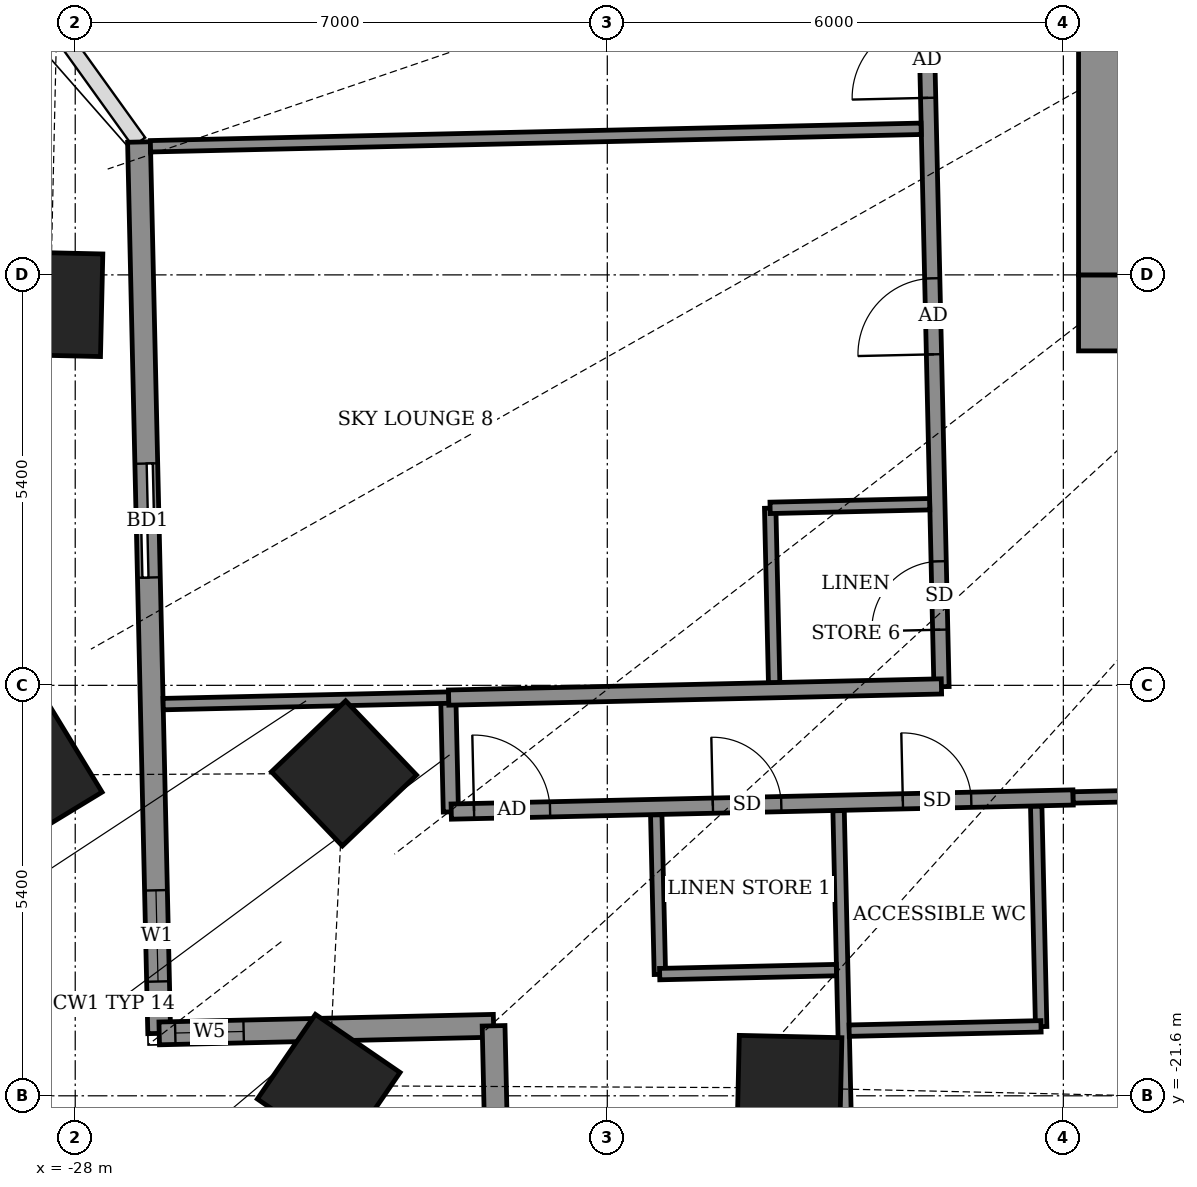
"""IFC4 building model, lengths in metres.
Left out: names, types, materials, properties, quantities, classifications, styles, units other than length and angle.
Written with IfcOpenShell. Run it as: python <this file> out.ifc"""

import sys

from ifc_helpers import new_model, si_unit, direction, frame, frame_2d, origin, origin_2d, place, context, subcontext, project, spatial, rectangle, extrude, element, fill, save


model = new_model("IFC4")
c1 = context("Model", 3, precision=1e-05, world=origin(), true_north=direction((0.0, 1.0)))
c2 = subcontext(c1, "Body", "Model", "MODEL_VIEW")
j1 = project(units=[si_unit("LENGTHUNIT", "METRE"), si_unit("PLANEANGLEUNIT", "RADIAN")], contexts=[c1])
p1 = place(None, origin())
s1 = spatial("IfcSite", under=j1, at=p1, CompositionType="ELEMENT")
p2 = place(p1, origin())
s2 = spatial("IfcBuilding", under=s1, at=p2, CompositionType="ELEMENT")
p3 = place(p2, frame((0.0, 0.0, 125.5)))
s3 = spatial("IfcBuildingStorey", under=s2, at=p3, CompositionType="ELEMENT", Elevation=125.5)
for number, where, z_axis, x_axis in (
    (1, (-28.327, -11.184, -0.55), (0.0, 0.0, 1.0), (-0.023, -1.0, 0.0)),
    (2, (-28.574, -17.379, -0.55), (0.0, 0.0, 1.0), (0.52, -0.854, 0.0)),
    (3, (-24.464, -17.359, -0.55), (0.0, 0.0, 1.0), (0.691, -0.723, 0.0)),
    (4, (-24.665, -21.467, -0.55), (0.0, 0.0, 1.0), (0.825, -0.566, 0.0)),
    (5, (-18.604, -21.495, -0.55), (0.0, 0.0, 1.0), (1.0, -0.023, 0.0)),
):
    element("IfcColumn", number, at=place(p3, frame(where, z_axis=z_axis, x_axis=x_axis)), inside=s3, PredefinedType="COLUMN", context=c2, shape_type="SweptSolid", body=[
        extrude(rectangle(XDim=1.35, YDim=1.35, at=origin_2d()), origin(), (0.0, 0.0, 1.0), 4.6),
    ])
p4 = place(p3, frame((-27.161, -9.052, 0.0), z_axis=(0.0, 0.0, 1.0), x_axis=(0.022665616813, -0.999743101909, 0.0)))
e6 = element("IfcWall", 6, at=p4, inside=s3, PredefinedType="SOLIDWALL", context=c2, shape_type="SweptSolid", body=[
    extrude(rectangle(XDim=11.73, YDim=0.3, at=frame_2d((5.865, 0.0))), origin(), (0.0, 0.0, 1.0), 2.55),
])
p5 = place(p4, frame((4.231, 0.0, 0.0)))
e7 = element("IfcOpeningElement", 7, at=p5, cuts=e6, PredefinedType="OPENING", context=c2, shape_type="SweptSolid", body=[
    extrude(rectangle(XDim=1.5, YDim=2.4, at=frame_2d((0.75, 1.2))), frame((0.0, 0.16, 0.0), z_axis=(0.0, -1.0, 0.0), x_axis=(1.0, 0.0, 0.0)), (0.0, 0.0, 1.0), 0.32),
])
p6 = place(p4, frame((9.847, 0.0, 0.9)))
e8 = element("IfcOpeningElement", 8, at=p6, cuts=e6, PredefinedType="OPENING", context=c2, shape_type="SweptSolid", body=[
    extrude(rectangle(XDim=1.2, YDim=1.5, at=frame_2d((0.6, 0.75))), frame((0.0, 0.16, 0.0), z_axis=(0.0, -1.0, 0.0), x_axis=(1.0, 0.0, 0.0)), (0.0, 0.0, 1.0), 0.32),
])
p7 = place(p3, frame((-26.895, -20.779, 0.0), z_axis=(0.0, 0.0, 1.0), x_axis=(0.999741204967, 0.022749133868, 0.0)))
e9 = element("IfcWall", 9, at=p7, inside=s3, PredefinedType="SOLIDWALL", context=c2, shape_type="SweptSolid", body=[
    extrude(rectangle(XDim=4.4, YDim=0.3, at=frame_2d((2.2, 0.0))), origin(), (0.0, 0.0, 1.0), 2.65),
])
p8 = place(p7, frame((0.211, 0.0, 0.9)))
e10 = element("IfcOpeningElement", 10, at=p8, cuts=e9, PredefinedType="OPENING", context=c2, shape_type="SweptSolid", body=[
    extrude(rectangle(XDim=0.9, YDim=1.5, at=frame_2d((0.45, 0.75))), frame((0.0, 0.16, 0.0), z_axis=(0.0, -1.0, 0.0), x_axis=(1.0, 0.0, 0.0)), (0.0, 0.0, 1.0), 0.32),
])
p9 = place(p3, frame((-22.496, -20.679, 0.0), z_axis=(0.0, 0.0, 1.0), x_axis=(0.022749133868, -0.999741204967, 0.0)))
e11 = element("IfcWall", 11, at=p9, inside=s3, PredefinedType="SOLIDWALL", context=c2, shape_type="SweptSolid", body=[
    extrude(rectangle(XDim=4.4, YDim=0.3, at=frame_2d((2.2, 0.0))), origin(), (0.0, 0.0, 1.0), 2.65),
])
p10 = place(p9, frame((1.15, 0.0, 0.9)))
e12 = element("IfcOpeningElement", 12, at=p10, cuts=e11, PredefinedType="OPENING", context=c2, shape_type="SweptSolid", body=[
    extrude(rectangle(XDim=2.4, YDim=1.5, at=frame_2d((1.2, 0.75))), frame((0.0, 0.16, 0.0), z_axis=(0.0, -1.0, 0.0), x_axis=(1.0, 0.0, 0.0)), (0.0, 0.0, 1.0), 0.32),
])
p11 = place(p3, frame((-17.798, -24.824, 0.0), z_axis=(0.0, 0.0, 1.0), x_axis=(-0.022781023197, 0.999740478815, 0.0)))
e13 = element("IfcWall", 13, at=p11, inside=s3, PredefinedType="PARTITIONING", context=c2, shape_type="SweptSolid", body=[
    extrude(rectangle(XDim=6.977, YDim=0.15, at=frame_2d((3.488, 0.0))), origin(), (0.0, 0.0, 1.0), 2.65),
])
p12 = place(p3, frame((-15.292, -20.69, 0.0), z_axis=(0.0, 0.0, 1.0), x_axis=(-0.022388729138, 0.999749340989, 0.0)))
e14 = element("IfcWall", 14, at=p12, inside=s3, PredefinedType="PARTITIONING", context=c2, shape_type="SweptSolid", body=[
    extrude(rectangle(XDim=2.901, YDim=0.15, at=frame_2d((1.45, 0.0))), origin(), (0.0, 0.0, 1.0), 2.75),
])
p13 = place(p3, frame((-17.818, -20.743, 0.0), z_axis=(0.0, 0.0, 1.0), x_axis=(0.999746160391, 0.022530308093, 0.0)))
e15 = element("IfcWall", 15, at=p13, inside=s3, PredefinedType="PARTITIONING", context=c2, shape_type="SweptSolid", body=[
    extrude(rectangle(XDim=2.525, YDim=0.15, at=frame_2d((1.262, 0.0))), origin(), (0.0, 0.0, 1.0), 2.75),
])
p14 = place(p3, frame((-20.308, -20.003, 0.0), z_axis=(0.0, 0.0, 1.0), x_axis=(-0.022792727877, 0.999740212033, 0.0)))
e16 = element("IfcWall", 16, at=p14, inside=s3, PredefinedType="PARTITIONING", context=c2, shape_type="SweptSolid", body=[
    extrude(rectangle(XDim=2.099, YDim=0.15, at=frame_2d((1.05, 0.0))), origin(), (0.0, 0.0, 1.0), 2.65),
])
p15 = place(p3, frame((-20.311, -19.999, 0.0), z_axis=(0.0, 0.0, 1.0), x_axis=(0.999740478815, 0.022781023197, 0.0)))
e17 = element("IfcWall", 17, at=p15, inside=s3, PredefinedType="PARTITIONING", context=c2, shape_type="SweptSolid", body=[
    extrude(rectangle(XDim=2.325, YDim=0.15, at=frame_2d((1.163, 0.0))), origin(), (0.0, 0.0, 1.0), 2.75),
])
p16 = place(p3, frame((-23.058, -17.865, 0.0), z_axis=(0.0, 0.0, 1.0), x_axis=(-0.022617910375, 0.999744182344, 0.0)))
e18 = element("IfcWall", 18, at=p16, inside=s3, PredefinedType="PARTITIONING", context=c2, shape_type="SweptSolid", body=[
    extrude(rectangle(XDim=1.5, YDim=0.2, at=frame_2d((0.75, 0.0))), origin(), (0.0, 0.0, 1.0), 2.85),
])
p17 = place(p3, frame((-23.053, -17.861, 0.0), z_axis=(0.0, 0.0, 1.0), x_axis=(0.999741542811, 0.022734282003, 0.0)))
e19 = element("IfcWall", 19, at=p17, inside=s3, PredefinedType="PARTITIONING", context=c2, shape_type="SweptSolid", body=[
    extrude(rectangle(XDim=8.183, YDim=0.2, at=frame_2d((4.092, 0.0))), origin(), (0.0, 0.0, 1.0), 2.65),
])
p18 = place(p17, frame((0.3, 0.0, 0.0)))
e20 = element("IfcOpeningElement", 20, at=p18, cuts=e19, PredefinedType="OPENING", context=c2, shape_type="SweptSolid", body=[
    extrude(rectangle(XDim=1.0, YDim=2.1, at=frame_2d((0.5, 1.05))), frame((0.0, 0.11, 0.0), z_axis=(0.0, -1.0, 0.0), x_axis=(1.0, 0.0, 0.0)), (0.0, 0.0, 1.0), 0.22),
])
p19 = place(p17, frame((3.443, 0.0, 0.0)))
e21 = element("IfcOpeningElement", 21, at=p19, cuts=e19, PredefinedType="OPENING", context=c2, shape_type="SweptSolid", body=[
    extrude(rectangle(XDim=0.9, YDim=2.1, at=frame_2d((0.45, 1.05))), frame((0.0, 0.11, 0.0), z_axis=(0.0, -1.0, 0.0), x_axis=(1.0, 0.0, 0.0)), (0.0, 0.0, 1.0), 0.22),
])
p20 = place(p17, frame((5.943, 0.0, 0.0)))
e22 = element("IfcOpeningElement", 22, at=p20, cuts=e19, PredefinedType="OPENING", context=c2, shape_type="SweptSolid", body=[
    extrude(rectangle(XDim=0.9, YDim=2.1, at=frame_2d((0.45, 1.05))), frame((0.0, 0.11, 0.0), z_axis=(0.0, -1.0, 0.0), x_axis=(1.0, 0.0, 0.0)), (0.0, 0.0, 1.0), 0.22),
])
p21 = place(p3, frame((-14.871, -17.675, 0.0), z_axis=(0.0, 0.0, 1.0), x_axis=(0.999742359486, 0.02269834024, 0.0)))
e23 = element("IfcWall", 23, at=p21, inside=s3, PredefinedType="PARTITIONING", context=c2, shape_type="SweptSolid", body=[
    extrude(rectangle(XDim=30.536, YDim=0.15, at=frame_2d((15.268, 0.0))), origin(), (0.0, 0.0, 1.0), 2.75),
])
p22 = place(p21, frame((0.784, 0.0, 0.0)))
e24 = element("IfcOpeningElement", 24, at=p22, cuts=e23, PredefinedType="OPENING", context=c2, shape_type="SweptSolid", body=[
    extrude(rectangle(XDim=1.0, YDim=2.1, at=frame_2d((0.5, 1.05))), frame((0.0, 0.085, 0.0), z_axis=(0.0, -1.0, 0.0), x_axis=(1.0, 0.0, 0.0)), (0.0, 0.0, 1.0), 0.17),
])
p23 = place(p21, frame((3.934, 0.0, 0.0)))
e25 = element("IfcOpeningElement", 25, at=p23, cuts=e23, PredefinedType="OPENING", context=c2, shape_type="SweptSolid", body=[
    extrude(rectangle(XDim=0.9, YDim=2.1, at=frame_2d((0.45, 1.05))), frame((0.0, 0.085, 0.0), z_axis=(0.0, -1.0, 0.0), x_axis=(1.0, 0.0, 0.0)), (0.0, 0.0, 1.0), 0.17),
])
p24 = place(p21, frame((11.384, 0.0, 0.0)))
e26 = element("IfcOpeningElement", 26, at=p24, cuts=e23, PredefinedType="OPENING", context=c2, shape_type="SweptSolid", body=[
    extrude(rectangle(XDim=0.9, YDim=2.1, at=frame_2d((0.45, 1.05))), frame((0.0, 0.085, 0.0), z_axis=(0.0, -1.0, 0.0), x_axis=(1.0, 0.0, 0.0)), (0.0, 0.0, 1.0), 0.17),
])
p25 = place(p21, frame((15.334, 0.0, 0.0)))
e27 = element("IfcOpeningElement", 27, at=p25, cuts=e23, PredefinedType="OPENING", context=c2, shape_type="SweptSolid", body=[
    extrude(rectangle(XDim=1.0, YDim=2.1, at=frame_2d((0.5, 1.05))), frame((0.0, 0.085, 0.0), z_axis=(0.0, -1.0, 0.0), x_axis=(1.0, 0.0, 0.0)), (0.0, 0.0, 1.0), 0.17),
])
p26 = place(p21, frame((19.259, 0.0, 0.0)))
e28 = element("IfcOpeningElement", 28, at=p26, cuts=e23, PredefinedType="OPENING", context=c2, shape_type="SweptSolid", body=[
    extrude(rectangle(XDim=0.9, YDim=2.1, at=frame_2d((0.45, 1.05))), frame((0.0, 0.085, 0.0), z_axis=(0.0, -1.0, 0.0), x_axis=(1.0, 0.0, 0.0)), (0.0, 0.0, 1.0), 0.17),
])
p27 = place(p21, frame((23.984, 0.0, 0.0)))
e29 = element("IfcOpeningElement", 29, at=p27, cuts=e23, PredefinedType="OPENING", context=c2, shape_type="SweptSolid", body=[
    extrude(rectangle(XDim=1.0, YDim=2.1, at=frame_2d((0.5, 1.05))), frame((0.0, 0.085, 0.0), z_axis=(0.0, -1.0, 0.0), x_axis=(1.0, 0.0, 0.0)), (0.0, 0.0, 1.0), 0.17),
])
p28 = place(p21, frame((21.659, 0.0, 0.0)))
e30 = element("IfcOpeningElement", 30, at=p28, cuts=e23, PredefinedType="OPENING", context=c2, shape_type="SweptSolid", body=[
    extrude(rectangle(XDim=0.9, YDim=2.1, at=frame_2d((0.45, 1.05))), frame((0.0, 0.085, 0.0), z_axis=(0.0, -1.0, 0.0), x_axis=(1.0, 0.0, 0.0)), (0.0, 0.0, 1.0), 0.17),
])
p29 = place(p21, frame((26.409, 0.0, 0.0)))
e31 = element("IfcOpeningElement", 31, at=p29, cuts=e23, PredefinedType="OPENING", context=c2, shape_type="SweptSolid", body=[
    extrude(rectangle(XDim=0.9, YDim=2.1, at=frame_2d((0.45, 1.05))), frame((0.0, 0.085, 0.0), z_axis=(0.0, -1.0, 0.0), x_axis=(1.0, 0.0, 0.0)), (0.0, 0.0, 1.0), 0.17),
])
p30 = place(p3, frame((-18.805, -16.168, 0.0), z_axis=(0.0, 0.0, 1.0), x_axis=(-0.022612884682, 0.999744296031, 0.0)))
e32 = element("IfcWall", 32, at=p30, inside=s3, PredefinedType="PARTITIONING", context=c2, shape_type="SweptSolid", body=[
    extrude(rectangle(XDim=2.3, YDim=0.15, at=frame_2d((1.15, 0.0))), origin(), (0.0, 0.0, 1.0), 2.85),
])
p31 = place(p3, frame((-16.603, -16.218, 0.0), z_axis=(0.0, 0.0, 1.0), x_axis=(-0.022698146637, 0.999742363881, 0.0)))
e33 = element("IfcWall", 33, at=p31, inside=s3, PredefinedType="PARTITIONING", context=c2, shape_type="SweptSolid", body=[
    extrude(rectangle(XDim=28.374, YDim=0.2, at=frame_2d((14.187, 0.0))), origin(), (0.0, 0.0, 1.0), 2.55),
])
p32 = place(p31, frame((21.524, 0.0, 0.0)))
e34 = element("IfcOpeningElement", 34, at=p32, cuts=e33, PredefinedType="OPENING", context=c2, shape_type="SweptSolid", body=[
    extrude(rectangle(XDim=1.0, YDim=2.1, at=frame_2d((0.5, 1.05))), frame((0.0, 0.11, 0.0), z_axis=(0.0, -1.0, 0.0), x_axis=(1.0, 0.0, 0.0)), (0.0, 0.0, 1.0), 0.22),
])
p33 = place(p31, frame((23.699, 0.0, 0.0)))
e35 = element("IfcOpeningElement", 35, at=p33, cuts=e33, PredefinedType="OPENING", context=c2, shape_type="SweptSolid", body=[
    extrude(rectangle(XDim=0.9, YDim=2.1, at=frame_2d((0.45, 1.05))), frame((0.0, 0.11, 0.0), z_axis=(0.0, -1.0, 0.0), x_axis=(1.0, 0.0, 0.0)), (0.0, 0.0, 1.0), 0.22),
])
p34 = place(p31, frame((17.124, 0.0, 0.0)))
e36 = element("IfcOpeningElement", 36, at=p34, cuts=e33, PredefinedType="OPENING", context=c2, shape_type="SweptSolid", body=[
    extrude(rectangle(XDim=1.0, YDim=2.1, at=frame_2d((0.5, 1.05))), frame((0.0, 0.11, 0.0), z_axis=(0.0, -1.0, 0.0), x_axis=(1.0, 0.0, 0.0)), (0.0, 0.0, 1.0), 0.22),
])
p35 = place(p31, frame((19.449, 0.0, 0.0)))
e37 = element("IfcOpeningElement", 37, at=p35, cuts=e33, PredefinedType="OPENING", context=c2, shape_type="SweptSolid", body=[
    extrude(rectangle(XDim=0.9, YDim=2.1, at=frame_2d((0.45, 1.05))), frame((0.0, 0.11, 0.0), z_axis=(0.0, -1.0, 0.0), x_axis=(1.0, 0.0, 0.0)), (0.0, 0.0, 1.0), 0.22),
])
p36 = place(p31, frame((14.849, 0.0, 0.0)))
e38 = element("IfcOpeningElement", 38, at=p36, cuts=e33, PredefinedType="OPENING", context=c2, shape_type="SweptSolid", body=[
    extrude(rectangle(XDim=1.0, YDim=2.1, at=frame_2d((0.5, 1.05))), frame((0.0, 0.11, 0.0), z_axis=(0.0, -1.0, 0.0), x_axis=(1.0, 0.0, 0.0)), (0.0, 0.0, 1.0), 0.22),
])
p37 = place(p31, frame((12.399, 0.0, 0.0)))
e39 = element("IfcOpeningElement", 39, at=p37, cuts=e33, PredefinedType="OPENING", context=c2, shape_type="SweptSolid", body=[
    extrude(rectangle(XDim=0.9, YDim=2.1, at=frame_2d((0.45, 1.05))), frame((0.0, 0.11, 0.0), z_axis=(0.0, -1.0, 0.0), x_axis=(1.0, 0.0, 0.0)), (0.0, 0.0, 1.0), 0.22),
])
p38 = place(p31, frame((7.749, 0.0, 0.0)))
e40 = element("IfcOpeningElement", 40, at=p38, cuts=e33, PredefinedType="OPENING", context=c2, shape_type="SweptSolid", body=[
    extrude(rectangle(XDim=1.0, YDim=2.1, at=frame_2d((0.5, 1.05))), frame((0.0, 0.11, 0.0), z_axis=(0.0, -1.0, 0.0), x_axis=(1.0, 0.0, 0.0)), (0.0, 0.0, 1.0), 0.22),
])
p39 = place(p31, frame((9.899, 0.0, 0.0)))
e41 = element("IfcOpeningElement", 41, at=p39, cuts=e33, PredefinedType="OPENING", context=c2, shape_type="SweptSolid", body=[
    extrude(rectangle(XDim=0.9, YDim=2.1, at=frame_2d((0.45, 1.05))), frame((0.0, 0.11, 0.0), z_axis=(0.0, -1.0, 0.0), x_axis=(1.0, 0.0, 0.0)), (0.0, 0.0, 1.0), 0.22),
])
p40 = place(p31, frame((4.374, 0.0, 0.0)))
e42 = element("IfcOpeningElement", 42, at=p40, cuts=e33, PredefinedType="OPENING", context=c2, shape_type="SweptSolid", body=[
    extrude(rectangle(XDim=1.0, YDim=2.1, at=frame_2d((0.5, 1.05))), frame((0.0, 0.11, 0.0), z_axis=(0.0, -1.0, 0.0), x_axis=(1.0, 0.0, 0.0)), (0.0, 0.0, 1.0), 0.22),
])
p41 = place(p31, frame((0.75, 0.0, 0.0)))
e43 = element("IfcOpeningElement", 43, at=p41, cuts=e33, PredefinedType="OPENING", context=c2, shape_type="SweptSolid", body=[
    extrude(rectangle(XDim=0.9, YDim=2.1, at=frame_2d((0.45, 1.05))), frame((0.0, 0.11, 0.0), z_axis=(0.0, -1.0, 0.0), x_axis=(1.0, 0.0, 0.0)), (0.0, 0.0, 1.0), 0.22),
])
p42 = place(p3, frame((-26.843, -16.447, 0.0), z_axis=(0.0, 0.0, 1.0), x_axis=(0.999738911718, 0.022849691379, 0.0)))
e44 = element("IfcWall", 44, at=p42, inside=s3, PredefinedType="PARTITIONING", context=c2, shape_type="SweptSolid", body=[
    extrude(rectangle(XDim=3.761, YDim=0.15, at=frame_2d((1.88, 0.0))), origin(), (0.0, 0.0, 1.0), 4.05),
])
p43 = place(p3, frame((-23.087, -16.361, 0.0), z_axis=(0.0, 0.0, 1.0), x_axis=(0.999743116792, 0.022664960319, 0.0)))
e45 = element("IfcWall", 45, at=p43, inside=s3, PredefinedType="PARTITIONING", context=c2, shape_type="SweptSolid", body=[
    extrude(rectangle(XDim=6.485, YDim=0.2, at=frame_2d((3.242, 0.0))), origin(), (0.0, 0.0, 1.0), 2.65),
])
p44 = place(p3, frame((-18.858, -13.865, 0.0), z_axis=(0.0, 0.0, 1.0), x_axis=(0.999737555419, 0.022908956429, 0.0)))
e46 = element("IfcWall", 46, at=p44, inside=s3, PredefinedType="PARTITIONING", context=c2, shape_type="SweptSolid", body=[
    extrude(rectangle(XDim=2.099, YDim=0.15, at=frame_2d((1.05, 0.0))), origin(), (0.0, 0.0, 1.0), 2.85),
])
p45 = place(p3, frame((-27.01, -9.108, 0.0), z_axis=(0.0, 0.0, 1.0), x_axis=(0.999742841246, 0.022677111331, 0.0)))
e47 = element("IfcWall", 47, at=p45, inside=s3, PredefinedType="PARTITIONING", context=c2, shape_type="SweptSolid", body=[
    extrude(rectangle(XDim=10.142, YDim=0.15, at=frame_2d((5.071, 0.0))), origin(), (0.0, 0.0, 1.0), 2.55),
])
p46 = place(p3, frame((-14.8, -11.3, 0.0), z_axis=(0.0, 0.0, 1.0), x_axis=(1.0, 0.0, 0.0)))
e48 = element("IfcWall", 48, at=p46, inside=s3, PredefinedType="SHEAR", context=c2, shape_type="SweptSolid", body=[
    extrude(rectangle(XDim=29.6, YDim=1.0, at=frame_2d((14.8, 0.0))), origin(), (0.0, 0.0, 1.0), 4.6),
])
p47 = place(p3, frame((-14.3, -10.8, 0.0), z_axis=(0.0, 0.0, 1.0), x_axis=(0.0, 1.0, 0.0)))
e49 = element("IfcWall", 49, at=p47, inside=s3, PredefinedType="SHEAR", context=c2, shape_type="SweptSolid", body=[
    extrude(rectangle(XDim=21.6, YDim=1.0, at=frame_2d((10.8, 0.0))), origin(), (0.0, 0.0, 1.0), 4.6),
])
p48 = place(p47, frame((8.25, 0.0, 0.0)))
e50 = element("IfcOpeningElement", 50, at=p48, cuts=e49, PredefinedType="OPENING", context=c2, shape_type="SweptSolid", body=[
    extrude(rectangle(XDim=1.2, YDim=2.1, at=frame_2d((0.6, 1.05))), frame((0.0, 0.51, 0.0), z_axis=(0.0, -1.0, 0.0), x_axis=(1.0, 0.0, 0.0)), (0.0, 0.0, 1.0), 1.02),
])
p49 = place(p47, frame((15.25, 0.0, 0.0)))
e51 = element("IfcOpeningElement", 51, at=p49, cuts=e49, PredefinedType="OPENING", context=c2, shape_type="SweptSolid", body=[
    extrude(rectangle(XDim=1.2, YDim=2.1, at=frame_2d((0.6, 1.05))), frame((0.0, 0.51, 0.0), z_axis=(0.0, -1.0, 0.0), x_axis=(1.0, 0.0, 0.0)), (0.0, 0.0, 1.0), 1.02),
])
p50 = place(p5, origin())
e52 = element("IfcDoor", 52, at=p50, inside=s3, OperationType="SLIDING_TO_LEFT", PredefinedType="DOOR", context=c2, shape_type="SweptSolid", body=[
    extrude(rectangle(XDim=1.5, YDim=2.4, at=frame_2d((0.75, 1.2))), frame((0.0, 0.025, 0.0), z_axis=(0.0, -1.0, 0.0), x_axis=(1.0, 0.0, 0.0)), (0.0, 0.0, 1.0), 0.05),
])
fill(e7, e52)
p51 = place(p6, origin())
e53 = element("IfcWindow", 53, at=p51, inside=s3, PartitioningType="SINGLE_PANEL", PredefinedType="WINDOW", context=c2, shape_type="SweptSolid", body=[
    extrude(rectangle(XDim=1.2, YDim=1.5, at=frame_2d((0.6, 0.75))), frame((0.0, 0.03, 0.0), z_axis=(0.0, -1.0, 0.0), x_axis=(1.0, 0.0, 0.0)), (0.0, 0.0, 1.0), 0.06),
])
fill(e8, e53)
p52 = place(p8, origin())
e54 = element("IfcWindow", 54, at=p52, inside=s3, PartitioningType="SINGLE_PANEL", PredefinedType="WINDOW", context=c2, shape_type="SweptSolid", body=[
    extrude(rectangle(XDim=0.9, YDim=1.5, at=frame_2d((0.45, 0.75))), frame((0.0, 0.03, 0.0), z_axis=(0.0, -1.0, 0.0), x_axis=(1.0, 0.0, 0.0)), (0.0, 0.0, 1.0), 0.06),
])
fill(e10, e54)
p53 = place(p18, origin())
e55 = element("IfcDoor", 55, at=p53, inside=s3, OperationType="SINGLE_SWING_LEFT", PredefinedType="DOOR", context=c2, shape_type="SweptSolid", body=[
    extrude(rectangle(XDim=1.0, YDim=2.1, at=frame_2d((0.5, 1.05))), frame((0.0, 0.025, 0.0), z_axis=(0.0, -1.0, 0.0), x_axis=(1.0, 0.0, 0.0)), (0.0, 0.0, 1.0), 0.05),
])
fill(e20, e55)
p54 = place(p19, origin())
e56 = element("IfcDoor", 56, at=p54, inside=s3, OperationType="SINGLE_SWING_LEFT", PredefinedType="DOOR", context=c2, shape_type="SweptSolid", body=[
    extrude(rectangle(XDim=0.9, YDim=2.1, at=frame_2d((0.45, 1.05))), frame((0.0, 0.025, 0.0), z_axis=(0.0, -1.0, 0.0), x_axis=(1.0, 0.0, 0.0)), (0.0, 0.0, 1.0), 0.05),
])
fill(e21, e56)
p55 = place(p20, origin())
e57 = element("IfcDoor", 57, at=p55, inside=s3, OperationType="SINGLE_SWING_RIGHT", PredefinedType="DOOR", context=c2, shape_type="SweptSolid", body=[
    extrude(rectangle(XDim=0.9, YDim=2.1, at=frame_2d((0.45, 1.05))), frame((0.0, 0.025, 0.0), z_axis=(0.0, -1.0, 0.0), x_axis=(1.0, 0.0, 0.0)), (0.0, 0.0, 1.0), 0.05),
])
fill(e22, e57)
p56 = place(p38, origin())
e58 = element("IfcDoor", 58, at=p56, inside=s3, OperationType="SINGLE_SWING_RIGHT", PredefinedType="DOOR", context=c2, shape_type="SweptSolid", body=[
    extrude(rectangle(XDim=1.0, YDim=2.1, at=frame_2d((0.5, 1.05))), frame((0.0, 0.025, 0.0), z_axis=(0.0, -1.0, 0.0), x_axis=(1.0, 0.0, 0.0)), (0.0, 0.0, 1.0), 0.05),
])
fill(e40, e58)
p57 = place(p40, origin())
e59 = element("IfcDoor", 59, at=p57, inside=s3, OperationType="SINGLE_SWING_LEFT", PredefinedType="DOOR", context=c2, shape_type="SweptSolid", body=[
    extrude(rectangle(XDim=1.0, YDim=2.1, at=frame_2d((0.5, 1.05))), frame((0.0, 0.025, 0.0), z_axis=(0.0, -1.0, 0.0), x_axis=(1.0, 0.0, 0.0)), (0.0, 0.0, 1.0), 0.05),
])
fill(e42, e59)
p58 = place(p41, origin())
e60 = element("IfcDoor", 60, at=p58, inside=s3, OperationType="SINGLE_SWING_LEFT", PredefinedType="DOOR", context=c2, shape_type="SweptSolid", body=[
    extrude(rectangle(XDim=0.9, YDim=2.1, at=frame_2d((0.45, 1.05))), frame((0.0, 0.025, 0.0), z_axis=(0.0, -1.0, 0.0), x_axis=(1.0, 0.0, 0.0)), (0.0, 0.0, 1.0), 0.05),
])
fill(e43, e60)
save(model, sys.argv[1])
